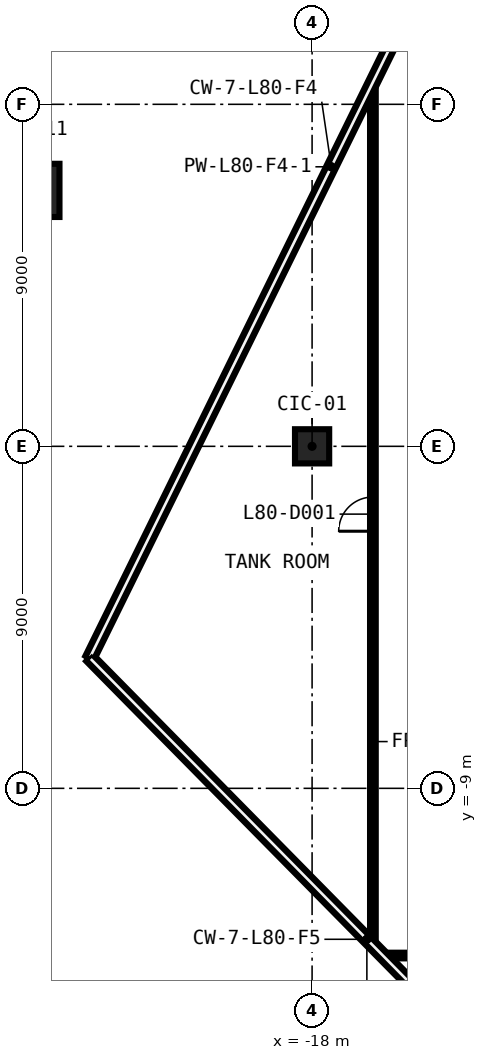
"""IFC4 building model, lengths in metres.
Left out: names, types, materials, properties, quantities, classifications, styles, units other than length and angle.
Written with IfcOpenShell. Run it as: python <this file> out.ifc"""

import sys

from ifc_helpers import new_model, si_unit, direction, frame, frame_2d, origin, origin_2d, place, context, subcontext, project, spatial, rectangle, hollow_rectangle, extrude, element, fill, save


model = new_model("IFC4")
c1 = context("Model", 3, precision=1e-05, world=origin(), true_north=direction((0.0, 1.0)))
c2 = subcontext(c1, "Body", "Model", "MODEL_VIEW")
j1 = project(units=[si_unit("LENGTHUNIT", "METRE"), si_unit("PLANEANGLEUNIT", "RADIAN")], contexts=[c1])
p1 = place(None, origin())
s1 = spatial("IfcSite", under=j1, at=p1, CompositionType="ELEMENT")
p2 = place(p1, origin())
s2 = spatial("IfcBuilding", under=s1, at=p2, CompositionType="ELEMENT")
p3 = place(p2, frame((0.0, 0.0, 371.6)))
s3 = spatial("IfcBuildingStorey", under=s2, at=p3, CompositionType="ELEMENT", Elevation=371.6)
p4 = place(p3, frame((-18.0, 0.0, 0.0), z_axis=(0.0, 0.0, 1.0), x_axis=(1.0, 0.0, 0.0)))
e1 = element("IfcColumn", 1, at=p4, inside=s3, PredefinedType="COLUMN", context=c2, shape_type="SweptSolid", body=[
    extrude(rectangle(XDim=0.9, YDim=0.9, at=origin_2d()), origin(), (0.0, 0.0, 1.0), 3.9),
])
p5 = place(p3, frame((-25.347, 6.735, 0.0), z_axis=(0.0, 0.0, 1.0), x_axis=(1.0, 0.0, 0.0)))
e2 = element("IfcColumn", 2, at=p5, inside=s3, PredefinedType="COLUMN", context=c2, shape_type="SweptSolid", body=[
    extrude(hollow_rectangle(XDim=1.4, YDim=1.4, WallThickness=0.06, at=origin_2d()), origin(), (0.0, 0.0, 1.0), 4.2),
])
p6 = place(p3, frame((14.656, -13.4, 0.0), z_axis=(0.0, 0.0, 1.0), x_axis=(-1.0, 0.0, 0.0)))
e3 = element("IfcWall", 3, at=p6, inside=s3, PredefinedType="PARTITIONING", context=c2, shape_type="SweptSolid", body=[
    extrude(rectangle(XDim=30.765, YDim=0.15, at=frame_2d((15.383, 0.0))), origin(), (0.0, 0.0, 1.0), 3.9),
])
p7 = place(p6, frame((14.933, 0.0, 0.0)))
e4 = element("IfcOpeningElement", 4, at=p7, cuts=e3, PredefinedType="OPENING", context=c2, shape_type="SweptSolid", body=[
    extrude(rectangle(XDim=0.9, YDim=2.1, at=frame_2d((0.45, 1.05))), frame((0.0, 0.085, 0.0), z_axis=(0.0, -1.0, 0.0), x_axis=(1.0, 0.0, 0.0)), (0.0, 0.0, 1.0), 0.17),
])
p8 = place(p3, frame((-16.4, -13.105, 0.0), z_axis=(0.0, 0.0, 1.0), x_axis=(0.0, 1.0, 0.0)))
e5 = element("IfcWall", 5, at=p8, inside=s3, PredefinedType="PARTITIONING", context=c2, shape_type="SweptSolid", body=[
    extrude(rectangle(XDim=22.641, YDim=0.15, at=frame_2d((11.321, 0.0))), origin(), (0.0, 0.0, 1.0), 3.9),
])
p9 = place(p8, frame((10.871, 0.0, 0.0)))
e6 = element("IfcOpeningElement", 6, at=p9, cuts=e5, PredefinedType="OPENING", context=c2, shape_type="SweptSolid", body=[
    extrude(rectangle(XDim=0.9, YDim=2.1, at=frame_2d((0.45, 1.05))), frame((0.0, 0.085, 0.0), z_axis=(0.0, -1.0, 0.0), x_axis=(1.0, 0.0, 0.0)), (0.0, 0.0, 1.0), 0.17),
])
p10 = place(p3, frame((-11.138, 20.28, 0.0), z_axis=(0.0, 0.0, 1.0), x_axis=(-0.441342255748, -0.897338850876, 0.0)))
e7 = element("IfcWall", 7, at=p10, inside=s3, PredefinedType="SOLIDWALL", context=c2, shape_type="SweptSolid", body=[
    extrude(rectangle(XDim=28.805, YDim=0.25, at=frame_2d((14.403, 0.0))), origin(), (0.0, 0.0, 1.0), 3.8),
])
p11 = place(p3, frame((-23.851, -5.568, 0.0), z_axis=(0.0, 0.0, 1.0), x_axis=(0.701718568407, -0.712454244673, 0.0)))
e8 = element("IfcWall", 8, at=p11, inside=s3, PredefinedType="SOLIDWALL", context=c2, shape_type="SweptSolid", body=[
    extrude(rectangle(XDim=20.785, YDim=0.25, at=frame_2d((10.393, 0.0))), origin(), (0.0, 0.0, 1.0), 3.8),
])
p12 = place(p9, origin())
e9 = element("IfcDoor", 9, at=p12, inside=s3, OperationType="SINGLE_SWING_RIGHT", PredefinedType="DOOR", context=c2, shape_type="SweptSolid", body=[
    extrude(rectangle(XDim=0.9, YDim=2.1, at=frame_2d((0.45, 1.05))), frame((0.0, 0.025, 0.0), z_axis=(0.0, -1.0, 0.0), x_axis=(1.0, 0.0, 0.0)), (0.0, 0.0, 1.0), 0.05),
])
fill(e6, e9)
save(model, sys.argv[1])
